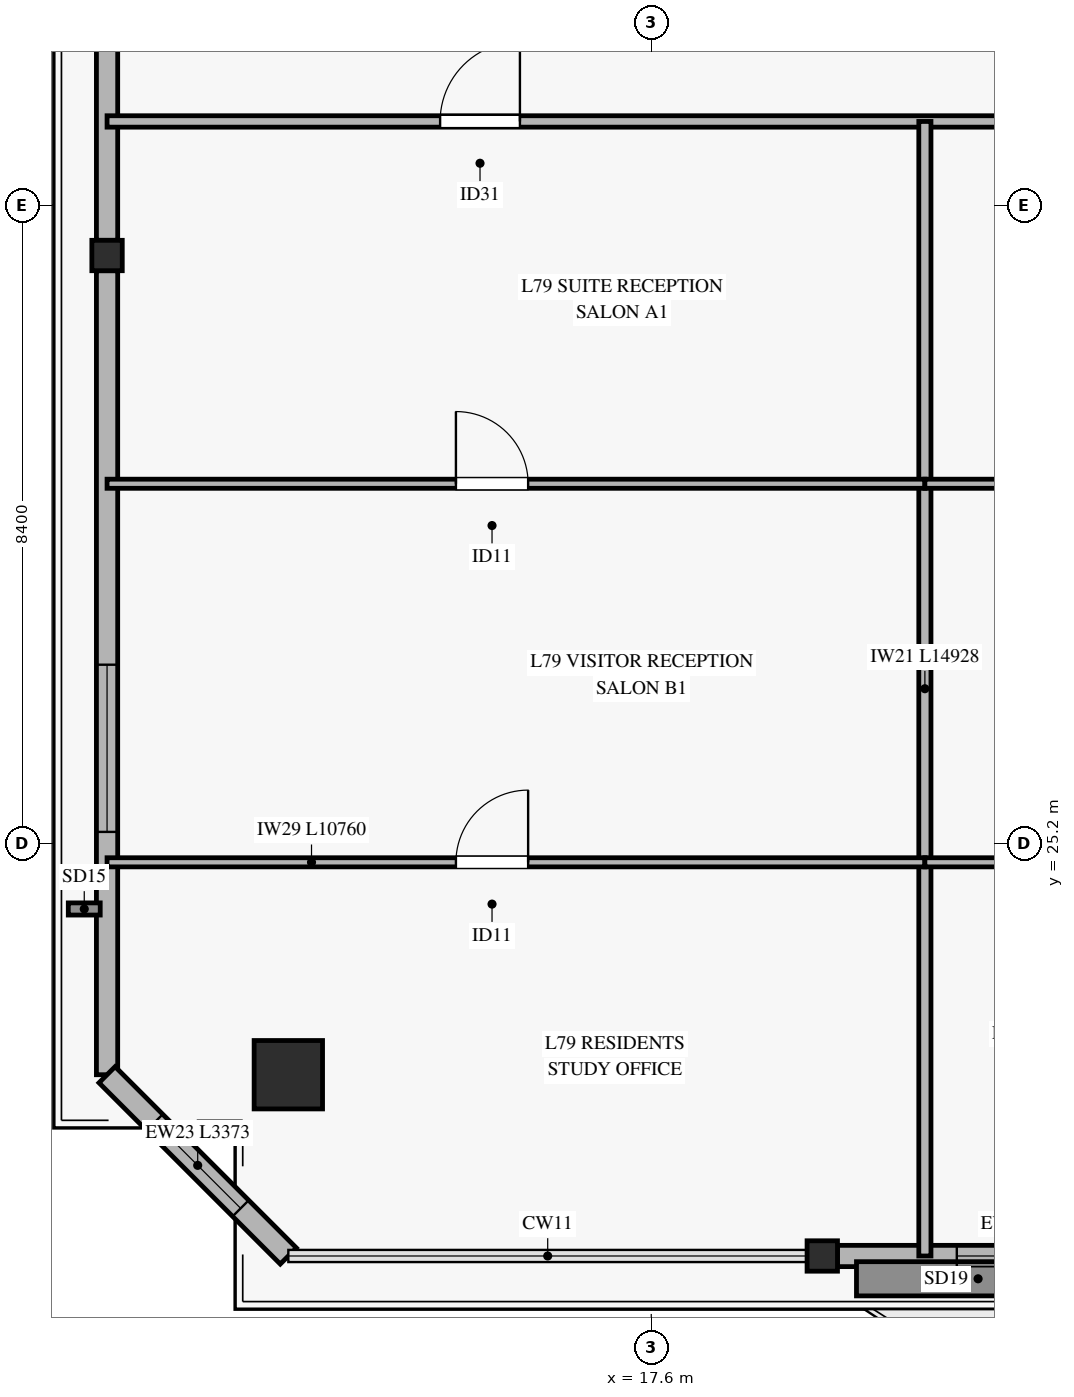
"""IFC4 building model, lengths in metres.
Left out: names, types, materials, properties, quantities, classifications, styles, units other than length and angle.
Written with IfcOpenShell. Run it as: python <this file> out.ifc"""

import sys

from ifc_helpers import new_model, si_unit, direction, frame, frame_2d, origin, origin_2d, place, context, subcontext, project, spatial, rectangle, hollow_rectangle, extrude, source, transform, mapped, element, fill, save


model = new_model("IFC4")
c1 = context("Model", 3, precision=1e-05, world=origin(), true_north=direction((0.0, 1.0)))
c2 = subcontext(c1, "Body", "Model", "MODEL_VIEW")
j1 = project(units=[si_unit("LENGTHUNIT", "METRE"), si_unit("PLANEANGLEUNIT", "RADIAN")], contexts=[c1])
p1 = place(None, origin())
s1 = spatial("IfcSite", under=j1, at=p1, CompositionType="ELEMENT")
p2 = place(p1, origin())
s2 = spatial("IfcBuilding", under=s1, at=p2, CompositionType="ELEMENT")
p3 = place(p2, frame((0.0, 0.0, 307.4)))
s3 = spatial("IfcBuildingStorey", under=s2, at=p3, CompositionType="ELEMENT", Elevation=307.4)
m1 = source(origin(), c2, "Body", "SweptSolid", [
    extrude(hollow_rectangle(XDim=0.9, YDim=0.9, WallThickness=0.04, at=origin_2d()), origin(), (0.0, 0.0, 1.0), 3.185),
])
p4 = place(p3, frame((12.825, 22.157, 0.0), z_axis=(0.0, 0.0, 1.0), x_axis=(1.0, 0.0, 0.0)))
e1 = element("IfcColumn", 1, at=p4, inside=s3, PredefinedType="COLUMN", context=c2, shape_type="MappedRepresentation", body=[
    mapped(m1, transform((0.0, 0.0, 0.0), x_axis=(1.0, 0.0, 0.0), y_axis=(0.0, 1.0, 0.0), z_axis=(0.0, 0.0, 1.0), scale=1.0)),
])
m2 = source(origin(), c2, "Body", "SweptSolid", [
    extrude(hollow_rectangle(XDim=0.4, YDim=0.4, WallThickness=0.02, at=origin_2d()), origin(), (0.0, 0.0, 1.0), 3.185),
])
for number, where, z_axis, x_axis in (
    (2, (19.85, 19.772, 0.0), (0.0, 0.0, 1.0), (1.0, 0.0, 0.0)),
    (3, (10.44, 32.936, 0.0), (0.0, 0.0, 1.0), (1.0, 0.0, 0.0)),
):
    element("IfcColumn", number, at=place(p3, frame(where, z_axis=z_axis, x_axis=x_axis)), inside=s3, PredefinedType="COLUMN", context=c2, shape_type="MappedRepresentation", body=[
        mapped(m2, transform((0.0, 0.0, 0.0), x_axis=(1.0, 0.0, 0.0), y_axis=(0.0, 1.0, 0.0), z_axis=(0.0, 0.0, 1.0), scale=1.0)),
    ])
p5 = place(p3, frame((20.05, 19.772, 0.0), z_axis=(0.0, 0.0, 1.0), x_axis=(1.0, 0.0, 0.0)))
e4 = element("IfcWall", 4, at=p5, inside=s3, PredefinedType="SOLIDWALL", context=c2, shape_type="SweptSolid", body=[
    extrude(rectangle(XDim=10.55, YDim=0.28, at=frame_2d((5.275, 0.0))), origin(), (0.0, 0.0, 1.0), 2.815),
])
p6 = place(p5, frame((4.35, 0.0, 0.0)))
e5 = element("IfcOpeningElement", 5, at=p6, cuts=e4, PredefinedType="OPENING", context=c2, shape_type="SweptSolid", body=[
    extrude(rectangle(XDim=1.8, YDim=2.25, at=frame_2d((0.9, 1.125))), frame((0.0, 0.15, 0.0), z_axis=(0.0, -1.0, 0.0), x_axis=(1.0, 0.0, 0.0)), (0.0, 0.0, 1.0), 0.3),
])
p7 = place(p5, frame((1.57, 0.0, 0.45)))
e6 = element("IfcOpeningElement", 6, at=p7, cuts=e4, PredefinedType="OPENING", context=c2, shape_type="SweptSolid", body=[
    extrude(rectangle(XDim=2.2, YDim=2.1, at=frame_2d((1.1, 1.05))), frame((0.0, 0.15, 0.0), z_axis=(0.0, -1.0, 0.0), x_axis=(1.0, 0.0, 0.0)), (0.0, 0.0, 1.0), 0.3),
])
p8 = place(p5, frame((7.35, 0.0, 0.45)))
e7 = element("IfcOpeningElement", 7, at=p8, cuts=e4, PredefinedType="OPENING", context=c2, shape_type="SweptSolid", body=[
    extrude(rectangle(XDim=1.6, YDim=2.0, at=frame_2d((0.8, 1.0))), frame((0.0, 0.15, 0.0), z_axis=(0.0, -1.0, 0.0), x_axis=(1.0, 0.0, 0.0)), (0.0, 0.0, 1.0), 0.3),
])
p9 = place(p3, frame((10.44, 22.157, 0.0), z_axis=(0.0, 0.0, 1.0), x_axis=(0.0, 1.0, 0.0)))
e8 = element("IfcWall", 8, at=p9, inside=s3, PredefinedType="SOLIDWALL", context=c2, shape_type="SweptSolid", body=[
    extrude(rectangle(XDim=10.579, YDim=0.28, at=frame_2d((5.29, 0.0))), origin(), (0.0, 0.0, 1.0), 2.815),
])
p10 = place(p9, frame((3.195, 0.0, 0.45)))
e9 = element("IfcOpeningElement", 9, at=p10, cuts=e8, PredefinedType="OPENING", context=c2, shape_type="SweptSolid", body=[
    extrude(rectangle(XDim=2.2, YDim=2.1, at=frame_2d((1.1, 1.05))), frame((0.0, 0.15, 0.0), z_axis=(0.0, -1.0, 0.0), x_axis=(1.0, 0.0, 0.0)), (0.0, 0.0, 1.0), 0.3),
])
p11 = place(p3, frame((10.44, 33.136, 0.0), z_axis=(0.0, 0.0, 1.0), x_axis=(0.0, 1.0, 0.0)))
e10 = element("IfcWall", 10, at=p11, inside=s3, PredefinedType="SOLIDWALL", context=c2, shape_type="SweptSolid", body=[
    extrude(rectangle(XDim=10.579, YDim=0.28, at=frame_2d((5.29, 0.0))), origin(), (0.0, 0.0, 1.0), 2.815),
])
p12 = place(p11, frame((6.102, 0.0, 0.45)))
e11 = element("IfcOpeningElement", 11, at=p12, cuts=e10, PredefinedType="OPENING", context=c2, shape_type="SweptSolid", body=[
    extrude(rectangle(XDim=2.2, YDim=2.1, at=frame_2d((1.1, 1.05))), frame((0.0, 0.15, 0.0), z_axis=(0.0, -1.0, 0.0), x_axis=(1.0, 0.0, 0.0)), (0.0, 0.0, 1.0), 0.3),
])
p13 = place(p3, frame((10.44, 22.157, 0.0), z_axis=(0.0, 0.0, 1.0), x_axis=(0.707106781187, -0.707106781187, 0.0)))
e12 = element("IfcWall", 12, at=p13, inside=s3, PredefinedType="SOLIDWALL", context=c2, shape_type="SweptSolid", body=[
    extrude(rectangle(XDim=3.373, YDim=0.3, at=frame_2d((1.687, 0.0))), origin(), (0.0, 0.0, 1.0), 2.815),
])
p14 = place(p13, frame((0.886, 0.0, 0.45)))
e13 = element("IfcOpeningElement", 13, at=p14, cuts=e12, PredefinedType="OPENING", context=c2, shape_type="SweptSolid", body=[
    extrude(rectangle(XDim=1.6, YDim=2.0, at=frame_2d((0.8, 1.0))), frame((0.0, 0.16, 0.0), z_axis=(0.0, -1.0, 0.0), x_axis=(1.0, 0.0, 0.0)), (0.0, 0.0, 1.0), 0.32),
])
p15 = place(p3, frame((10.44, 34.7, 0.0), z_axis=(0.0, 0.0, 1.0), x_axis=(1.0, 0.0, 0.0)))
e14 = element("IfcWall", 14, at=p15, inside=s3, PredefinedType="PARTITIONING", context=c2, shape_type="SweptSolid", body=[
    extrude(rectangle(XDim=49.52, YDim=0.15, at=frame_2d((24.76, 0.0))), origin(), (0.0, 0.0, 1.0), 2.47),
])
p16 = place(p15, frame((4.382, 0.0, 0.0)))
e15 = element("IfcOpeningElement", 15, at=p16, cuts=e14, PredefinedType="OPENING", context=c2, shape_type="SweptSolid", body=[
    extrude(rectangle(XDim=1.05, YDim=2.15, at=frame_2d((0.525, 1.075))), frame((0.0, 0.085, 0.0), z_axis=(0.0, -1.0, 0.0), x_axis=(1.0, 0.0, 0.0)), (0.0, 0.0, 1.0), 0.17),
])
p17 = place(p15, frame((15.945, 0.0, 0.0)))
e16 = element("IfcOpeningElement", 16, at=p17, cuts=e14, PredefinedType="OPENING", context=c2, shape_type="SweptSolid", body=[
    extrude(rectangle(XDim=1.05, YDim=2.15, at=frame_2d((0.525, 1.075))), frame((0.0, 0.085, 0.0), z_axis=(0.0, -1.0, 0.0), x_axis=(1.0, 0.0, 0.0)), (0.0, 0.0, 1.0), 0.17),
])
p18 = place(p15, frame((28.233, 0.0, 0.0)))
e17 = element("IfcOpeningElement", 17, at=p18, cuts=e14, PredefinedType="OPENING", context=c2, shape_type="SweptSolid", body=[
    extrude(rectangle(XDim=1.05, YDim=2.15, at=frame_2d((0.525, 1.075))), frame((0.0, 0.085, 0.0), z_axis=(0.0, -1.0, 0.0), x_axis=(1.0, 0.0, 0.0)), (0.0, 0.0, 1.0), 0.17),
])
p19 = place(p15, frame((40.462, 0.0, 0.0)))
e18 = element("IfcOpeningElement", 18, at=p19, cuts=e14, PredefinedType="OPENING", context=c2, shape_type="SweptSolid", body=[
    extrude(rectangle(XDim=1.05, YDim=2.15, at=frame_2d((0.525, 1.075))), frame((0.0, 0.085, 0.0), z_axis=(0.0, -1.0, 0.0), x_axis=(1.0, 0.0, 0.0)), (0.0, 0.0, 1.0), 0.17),
])
p20 = place(p3, frame((21.2, 19.772, 0.0), z_axis=(0.0, 0.0, 1.0), x_axis=(0.0, 1.0, 0.0)))
e19 = element("IfcWall", 19, at=p20, inside=s3, PredefinedType="PARTITIONING", context=c2, shape_type="SweptSolid", body=[
    extrude(rectangle(XDim=14.928, YDim=0.16, at=frame_2d((7.464, 0.0))), origin(), (0.0, 0.0, 1.0), 2.77),
])
p21 = place(p3, frame((10.44, 24.952, 0.0), z_axis=(0.0, 0.0, 1.0), x_axis=(1.0, 0.0, 0.0)))
e20 = element("IfcWall", 20, at=p21, inside=s3, PredefinedType="PARTITIONING", context=c2, shape_type="SweptSolid", body=[
    extrude(rectangle(XDim=10.76, YDim=0.12, at=frame_2d((5.38, 0.0))), origin(), (0.0, 0.0, 1.0), 2.47),
])
p22 = place(p21, frame((4.59, 0.0, 0.0)))
e21 = element("IfcOpeningElement", 21, at=p22, cuts=e20, PredefinedType="OPENING", context=c2, shape_type="SweptSolid", body=[
    extrude(rectangle(XDim=0.95, YDim=2.1, at=frame_2d((0.475, 1.05))), frame((0.0, 0.07, 0.0), z_axis=(0.0, -1.0, 0.0), x_axis=(1.0, 0.0, 0.0)), (0.0, 0.0, 1.0), 0.14),
])
p23 = place(p3, frame((10.44, 29.933, 0.0), z_axis=(0.0, 0.0, 1.0), x_axis=(1.0, 0.0, 0.0)))
e22 = element("IfcWall", 22, at=p23, inside=s3, PredefinedType="PARTITIONING", context=c2, shape_type="SweptSolid", body=[
    extrude(rectangle(XDim=10.76, YDim=0.12, at=frame_2d((5.38, 0.0))), origin(), (0.0, 0.0, 1.0), 2.47),
])
p24 = place(p23, frame((4.59, 0.0, 0.0)))
e23 = element("IfcOpeningElement", 23, at=p24, cuts=e22, PredefinedType="OPENING", context=c2, shape_type="SweptSolid", body=[
    extrude(rectangle(XDim=0.95, YDim=2.1, at=frame_2d((0.475, 1.05))), frame((0.0, 0.07, 0.0), z_axis=(0.0, -1.0, 0.0), x_axis=(1.0, 0.0, 0.0)), (0.0, 0.0, 1.0), 0.14),
])
p25 = place(p3, frame((21.2, 24.952, 0.0), z_axis=(0.0, 0.0, 1.0), x_axis=(1.0, 0.0, 0.0)))
e24 = element("IfcWall", 24, at=p25, inside=s3, PredefinedType="PARTITIONING", context=c2, shape_type="SweptSolid", body=[
    extrude(rectangle(XDim=13.2, YDim=0.12, at=frame_2d((6.6, 0.0))), origin(), (0.0, 0.0, 1.0), 2.47),
])
p26 = place(p25, frame((5.446, 0.0, 0.0)))
e25 = element("IfcOpeningElement", 25, at=p26, cuts=e24, PredefinedType="OPENING", context=c2, shape_type="SweptSolid", body=[
    extrude(rectangle(XDim=0.95, YDim=2.1, at=frame_2d((0.475, 1.05))), frame((0.0, 0.07, 0.0), z_axis=(0.0, -1.0, 0.0), x_axis=(1.0, 0.0, 0.0)), (0.0, 0.0, 1.0), 0.14),
])
p27 = place(p3, frame((21.2, 29.933, 0.0), z_axis=(0.0, 0.0, 1.0), x_axis=(1.0, 0.0, 0.0)))
e26 = element("IfcWall", 26, at=p27, inside=s3, PredefinedType="PARTITIONING", context=c2, shape_type="SweptSolid", body=[
    extrude(rectangle(XDim=13.2, YDim=0.12, at=frame_2d((6.6, 0.0))), origin(), (0.0, 0.0, 1.0), 2.47),
])
p28 = place(p27, frame((5.446, 0.0, 0.0)))
e27 = element("IfcOpeningElement", 27, at=p28, cuts=e26, PredefinedType="OPENING", context=c2, shape_type="SweptSolid", body=[
    extrude(rectangle(XDim=0.95, YDim=2.1, at=frame_2d((0.475, 1.05))), frame((0.0, 0.07, 0.0), z_axis=(0.0, -1.0, 0.0), x_axis=(1.0, 0.0, 0.0)), (0.0, 0.0, 1.0), 0.14),
])
m3 = source(origin(), c2, "Body", "SweptSolid", [
    extrude(rectangle(XDim=2.2, YDim=2.1, at=frame_2d((1.1, 1.05))), frame((0.0, 0.03, 0.0), z_axis=(0.0, -1.0, 0.0), x_axis=(1.0, 0.0, 0.0)), (0.0, 0.0, 1.0), 0.06),
])
p29 = place(p7, origin())
e28 = element("IfcWindow", 28, at=p29, inside=s3, PartitioningType="SINGLE_PANEL", PredefinedType="WINDOW", context=c2, shape_type="MappedRepresentation", body=[
    mapped(m3, transform((0.0, 0.0, 0.0), x_axis=(1.0, 0.0, 0.0), y_axis=(0.0, 1.0, 0.0), z_axis=(0.0, 0.0, 1.0), scale=1.0)),
])
fill(e6, e28)
p30 = place(p10, origin())
e29 = element("IfcWindow", 29, at=p30, inside=s3, PartitioningType="SINGLE_PANEL", PredefinedType="WINDOW", context=c2, shape_type="MappedRepresentation", body=[
    mapped(m3, transform((0.0, 0.0, 0.0), x_axis=(1.0, 0.0, 0.0), y_axis=(0.0, 1.0, 0.0), z_axis=(0.0, 0.0, 1.0), scale=1.0)),
])
fill(e9, e29)
m4 = source(origin(), c2, "Body", "SweptSolid", [
    extrude(rectangle(XDim=1.6, YDim=2.0, at=frame_2d((0.8, 1.0))), frame((0.0, 0.03, 0.0), z_axis=(0.0, -1.0, 0.0), x_axis=(1.0, 0.0, 0.0)), (0.0, 0.0, 1.0), 0.06),
])
p31 = place(p14, origin())
e30 = element("IfcWindow", 30, at=p31, inside=s3, PartitioningType="SINGLE_PANEL", PredefinedType="WINDOW", context=c2, shape_type="MappedRepresentation", body=[
    mapped(m4, transform((0.0, 0.0, 0.0), x_axis=(1.0, 0.0, 0.0), y_axis=(0.0, 1.0, 0.0), z_axis=(0.0, 0.0, 1.0), scale=1.0)),
])
fill(e13, e30)
m5 = source(origin(), c2, "Body", "SweptSolid", [
    extrude(rectangle(XDim=1.05, YDim=2.15, at=frame_2d((0.525, 1.075))), frame((0.0, 0.025, 0.0), z_axis=(0.0, -1.0, 0.0), x_axis=(1.0, 0.0, 0.0)), (0.0, 0.0, 1.0), 0.05),
])
p32 = place(p16, origin())
e31 = element("IfcDoor", 31, at=p32, inside=s3, OperationType="SINGLE_SWING_RIGHT", PredefinedType="DOOR", context=c2, shape_type="MappedRepresentation", body=[
    mapped(m5, transform((0.0, 0.0, 0.0), x_axis=(1.0, 0.0, 0.0), y_axis=(0.0, 1.0, 0.0), z_axis=(0.0, 0.0, 1.0), scale=1.0)),
])
fill(e15, e31)
m6 = source(origin(), c2, "Body", "SweptSolid", [
    extrude(rectangle(XDim=0.95, YDim=2.1, at=frame_2d((0.475, 1.05))), frame((0.0, 0.025, 0.0), z_axis=(0.0, -1.0, 0.0), x_axis=(1.0, 0.0, 0.0)), (0.0, 0.0, 1.0), 0.05),
])
p33 = place(p24, origin())
e32 = element("IfcDoor", 32, at=p33, inside=s3, OperationType="SINGLE_SWING_LEFT", PredefinedType="DOOR", context=c2, shape_type="MappedRepresentation", body=[
    mapped(m6, transform((0.0, 0.0, 0.0), x_axis=(1.0, 0.0, 0.0), y_axis=(0.0, 1.0, 0.0), z_axis=(0.0, 0.0, 1.0), scale=1.0)),
])
fill(e23, e32)
p34 = place(p22, origin())
e33 = element("IfcDoor", 33, at=p34, inside=s3, OperationType="SINGLE_SWING_RIGHT", PredefinedType="DOOR", context=c2, shape_type="MappedRepresentation", body=[
    mapped(m6, transform((0.0, 0.0, 0.0), x_axis=(1.0, 0.0, 0.0), y_axis=(0.0, 1.0, 0.0), z_axis=(0.0, 0.0, 1.0), scale=1.0)),
])
fill(e21, e33)
save(model, sys.argv[1])
